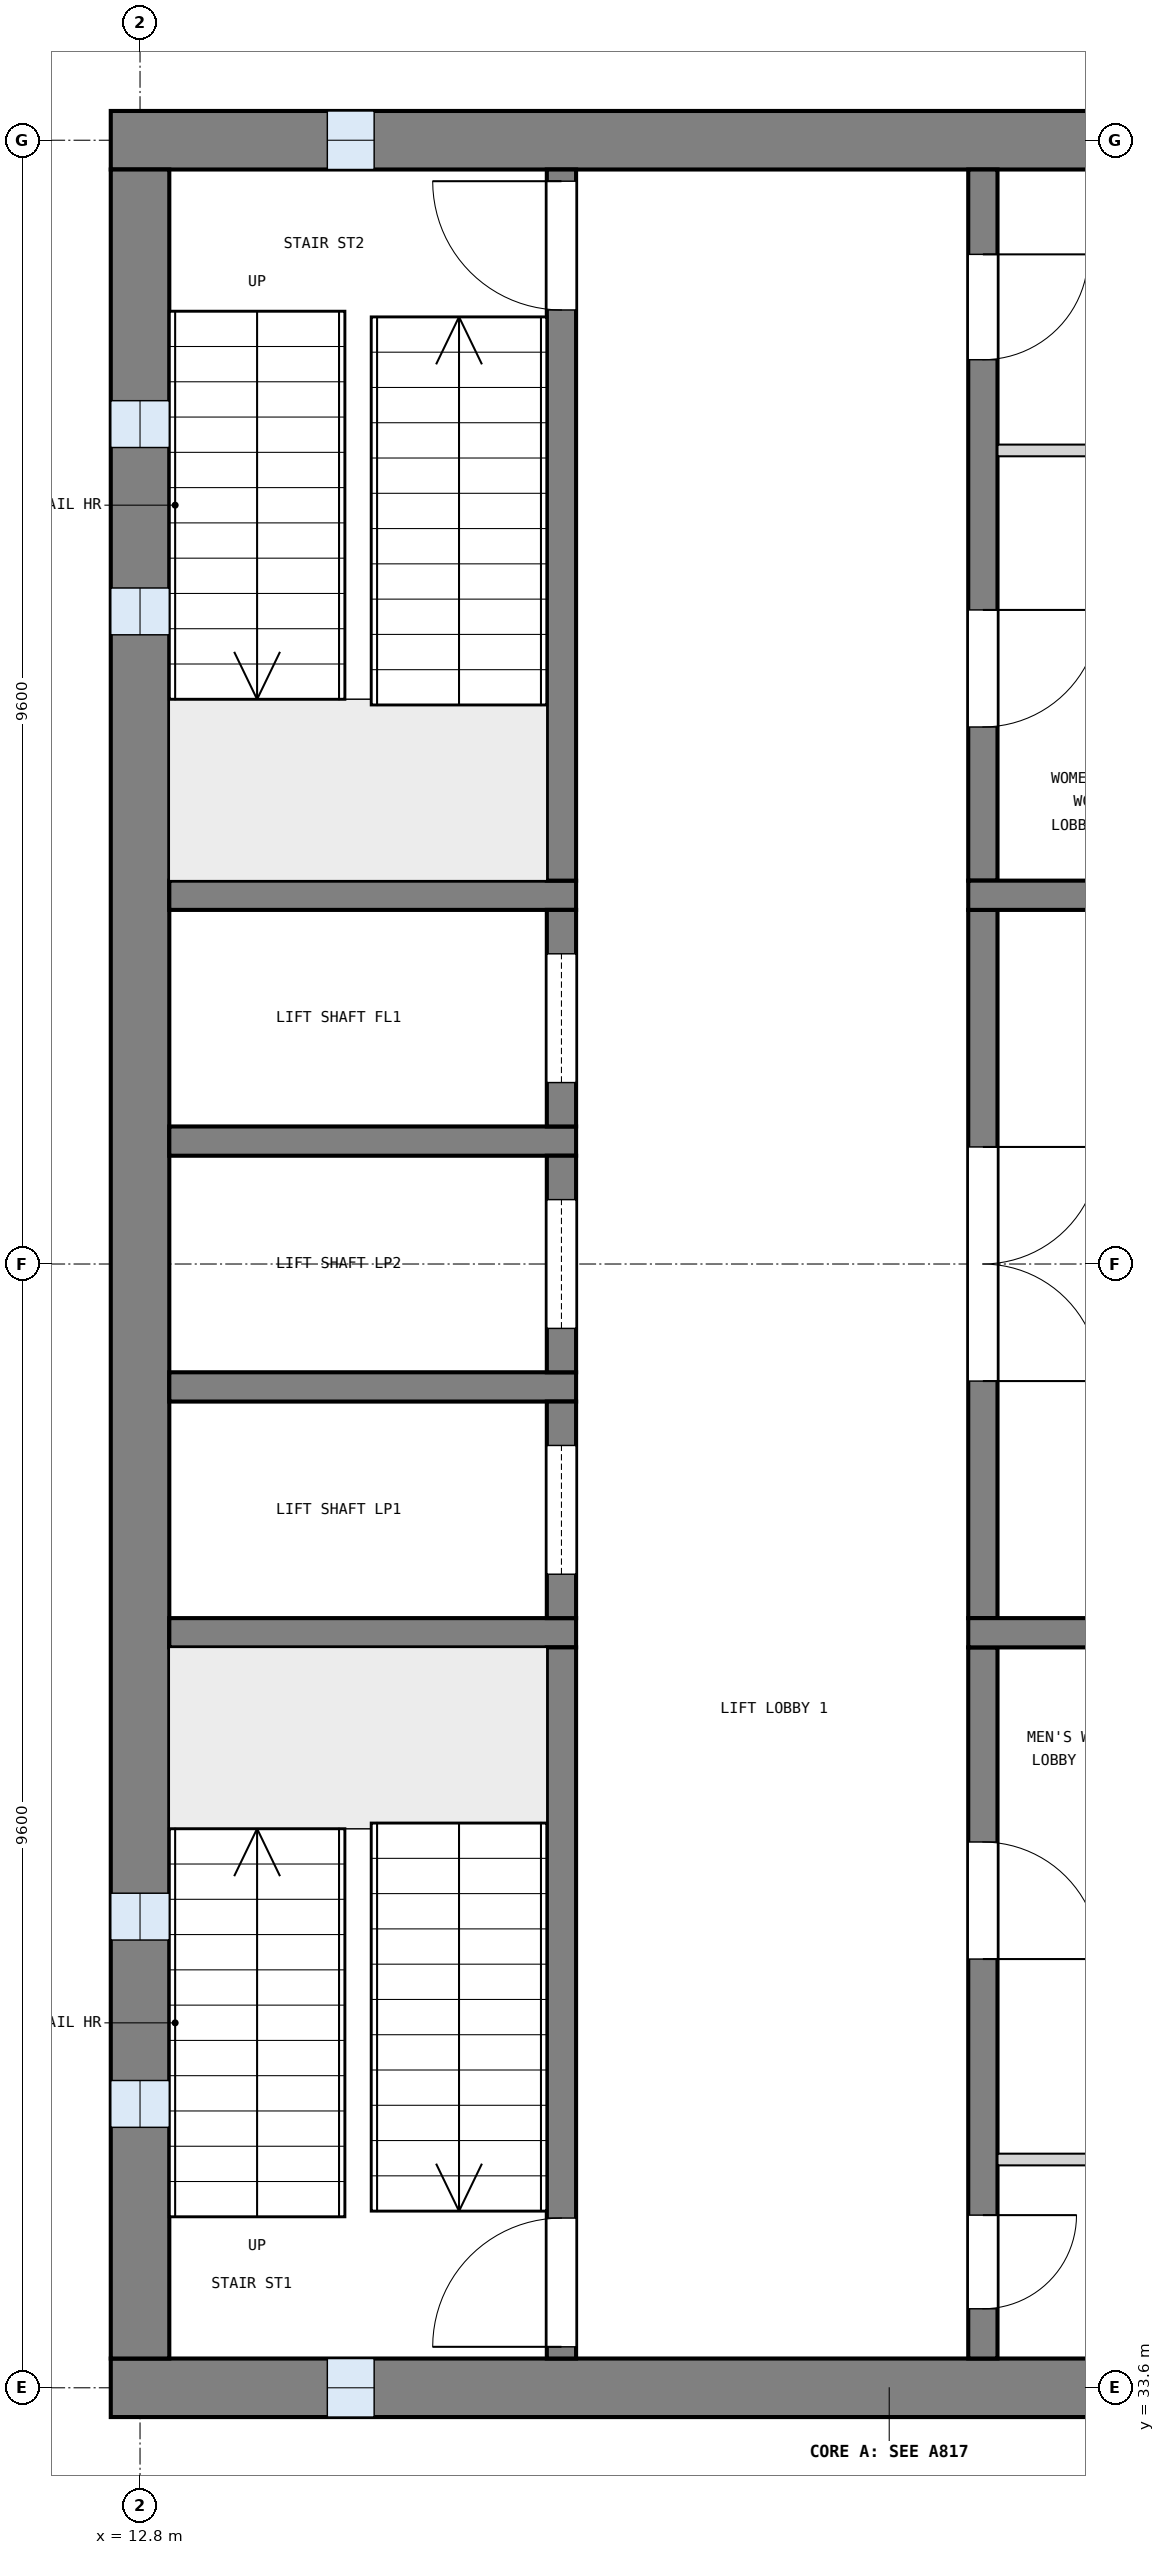
"""IFC4 building model, lengths in metres.
Left out: names, types, materials, properties, quantities, classifications, styles, units other than length and angle.
Written with IfcOpenShell. Run it as: python <this file> out.ifc"""

import sys

from ifc_helpers import new_model, si_unit, direction, frame, frame_2d, origin, place, context, subcontext, project, spatial, rectangle, extrude, element, fill, save


model = new_model("IFC4")
c1 = context("Model", 3, precision=1e-05, world=origin(), true_north=direction((0.0, 1.0)))
c2 = subcontext(c1, "Body", "Model", "MODEL_VIEW")
j1 = project(units=[si_unit("LENGTHUNIT", "METRE"), si_unit("PLANEANGLEUNIT", "RADIAN")], contexts=[c1])
p1 = place(None, origin())
s1 = spatial("IfcSite", under=j1, at=p1, CompositionType="ELEMENT")
p2 = place(p1, origin())
s2 = spatial("IfcBuilding", under=s1, at=p2, CompositionType="ELEMENT")
p3 = place(p2, frame((0.0, 0.0, 60.0)))
s3 = spatial("IfcBuildingStorey", under=s2, at=p3, CompositionType="ELEMENT", Elevation=60.0)
p4 = place(p3, frame((12.55, 52.8, 0.0), z_axis=(0.0, 0.0, 1.0), x_axis=(1.0, 0.0, 0.0)))
e1 = element("IfcWall", 1, at=p4, inside=s3, PredefinedType="SHEAR", context=c2, shape_type="SweptSolid", body=[
    extrude(rectangle(XDim=13.3, YDim=0.5, at=frame_2d((6.65, 0.0))), origin(), (0.0, 0.0, 1.0), 4.2),
])
p5 = place(p4, frame((1.85, 0.0, 1.0)))
e2 = element("IfcOpeningElement", 2, at=p5, cuts=e1, PredefinedType="OPENING", context=c2, shape_type="SweptSolid", body=[
    extrude(rectangle(XDim=0.4, YDim=2.0, at=frame_2d((0.2, 1.0))), frame((0.0, 0.26, 0.0), z_axis=(0.0, -1.0, 0.0), x_axis=(1.0, 0.0, 0.0)), (0.0, 0.0, 1.0), 0.52),
])
p6 = place(p3, frame((12.55, 33.6, 0.0), z_axis=(0.0, 0.0, 1.0), x_axis=(1.0, 0.0, 0.0)))
e3 = element("IfcWall", 3, at=p6, inside=s3, PredefinedType="SHEAR", context=c2, shape_type="SweptSolid", body=[
    extrude(rectangle(XDim=13.3, YDim=0.5, at=frame_2d((6.65, 0.0))), origin(), (0.0, 0.0, 1.0), 4.2),
])
p7 = place(p6, frame((1.85, 0.0, 1.0)))
e4 = element("IfcOpeningElement", 4, at=p7, cuts=e3, PredefinedType="OPENING", context=c2, shape_type="SweptSolid", body=[
    extrude(rectangle(XDim=0.4, YDim=2.0, at=frame_2d((0.2, 1.0))), frame((0.0, 0.26, 0.0), z_axis=(0.0, -1.0, 0.0), x_axis=(1.0, 0.0, 0.0)), (0.0, 0.0, 1.0), 0.52),
])
p8 = place(p3, frame((12.8, 33.85, 0.0), z_axis=(0.0, 0.0, 1.0), x_axis=(0.0, 1.0, 0.0)))
e5 = element("IfcWall", 5, at=p8, inside=s3, PredefinedType="SHEAR", context=c2, shape_type="SweptSolid", body=[
    extrude(rectangle(XDim=18.7, YDim=0.5, at=frame_2d((9.35, 0.0))), origin(), (0.0, 0.0, 1.0), 4.2),
])
p9 = place(p8, frame((1.975, 0.0, 1.0)))
e6 = element("IfcOpeningElement", 6, at=p9, cuts=e5, PredefinedType="OPENING", context=c2, shape_type="SweptSolid", body=[
    extrude(rectangle(XDim=0.4, YDim=2.0, at=frame_2d((0.2, 1.0))), frame((0.0, 0.26, 0.0), z_axis=(0.0, -1.0, 0.0), x_axis=(1.0, 0.0, 0.0)), (0.0, 0.0, 1.0), 0.52),
])
p10 = place(p8, frame((3.575, 0.0, 1.0)))
e7 = element("IfcOpeningElement", 7, at=p10, cuts=e5, PredefinedType="OPENING", context=c2, shape_type="SweptSolid", body=[
    extrude(rectangle(XDim=0.4, YDim=2.0, at=frame_2d((0.2, 1.0))), frame((0.0, 0.26, 0.0), z_axis=(0.0, -1.0, 0.0), x_axis=(1.0, 0.0, 0.0)), (0.0, 0.0, 1.0), 0.52),
])
p11 = place(p8, frame((14.725, 0.0, 1.0)))
e8 = element("IfcOpeningElement", 8, at=p11, cuts=e5, PredefinedType="OPENING", context=c2, shape_type="SweptSolid", body=[
    extrude(rectangle(XDim=0.4, YDim=2.0, at=frame_2d((0.2, 1.0))), frame((0.0, 0.26, 0.0), z_axis=(0.0, -1.0, 0.0), x_axis=(1.0, 0.0, 0.0)), (0.0, 0.0, 1.0), 0.52),
])
p12 = place(p8, frame((16.325, 0.0, 1.0)))
e9 = element("IfcOpeningElement", 9, at=p12, cuts=e5, PredefinedType="OPENING", context=c2, shape_type="SweptSolid", body=[
    extrude(rectangle(XDim=0.4, YDim=2.0, at=frame_2d((0.2, 1.0))), frame((0.0, 0.26, 0.0), z_axis=(0.0, -1.0, 0.0), x_axis=(1.0, 0.0, 0.0)), (0.0, 0.0, 1.0), 0.52),
])
for number, where, z_axis, x_axis in (
    (10, (13.05, 40.05, 0.0), (0.0, 0.0, 1.0), (1.0, 0.0, 0.0)),
    (11, (13.05, 42.15, 0.0), (0.0, 0.0, 1.0), (1.0, 0.0, 0.0)),
    (12, (13.05, 44.25, 0.0), (0.0, 0.0, 1.0), (1.0, 0.0, 0.0)),
    (13, (13.05, 46.35, 0.0), (0.0, 0.0, 1.0), (1.0, 0.0, 0.0)),
):
    element("IfcWall", number, at=place(p3, frame(where, z_axis=z_axis, x_axis=x_axis)), inside=s3, PredefinedType="SOLIDWALL", context=c2, shape_type="SweptSolid", body=[
        extrude(rectangle(XDim=3.475, YDim=0.25, at=frame_2d((1.737, 0.0))), origin(), (0.0, 0.0, 1.0), 3.9),
    ])
p13 = place(p3, frame((16.4, 33.85, 0.0), z_axis=(0.0, 0.0, 1.0), x_axis=(0.0, 1.0, 0.0)))
e14 = element("IfcWall", 14, at=p13, inside=s3, PredefinedType="SOLIDWALL", context=c2, shape_type="SweptSolid", body=[
    extrude(rectangle(XDim=6.075, YDim=0.25, at=frame_2d((3.038, 0.0))), origin(), (0.0, 0.0, 1.0), 3.9),
])
p14 = place(p13, frame((0.1, 0.0, 0.0)))
e15 = element("IfcOpeningElement", 15, at=p14, cuts=e14, PredefinedType="OPENING", context=c2, shape_type="SweptSolid", body=[
    extrude(rectangle(XDim=1.1, YDim=2.1, at=frame_2d((0.55, 1.05))), frame((0.0, 0.135, 0.0), z_axis=(0.0, -1.0, 0.0), x_axis=(1.0, 0.0, 0.0)), (0.0, 0.0, 1.0), 0.27),
])
p15 = place(p3, frame((16.4, 40.175, 0.0), z_axis=(0.0, 0.0, 1.0), x_axis=(0.0, 1.0, 0.0)))
e16 = element("IfcWall", 16, at=p15, inside=s3, PredefinedType="SOLIDWALL", context=c2, shape_type="SweptSolid", body=[
    extrude(rectangle(XDim=1.85, YDim=0.25, at=frame_2d((0.925, 0.0))), origin(), (0.0, 0.0, 1.0), 3.9),
])
p16 = place(p15, frame((0.375, 0.0, 0.0)))
e17 = element("IfcOpeningElement", 17, at=p16, cuts=e16, PredefinedType="OPENING", context=c2, shape_type="SweptSolid", body=[
    extrude(rectangle(XDim=1.1, YDim=2.1, at=frame_2d((0.55, 1.05))), frame((0.0, 0.135, 0.0), z_axis=(0.0, -1.0, 0.0), x_axis=(1.0, 0.0, 0.0)), (0.0, 0.0, 1.0), 0.27),
])
p17 = place(p3, frame((16.4, 42.275, 0.0), z_axis=(0.0, 0.0, 1.0), x_axis=(0.0, 1.0, 0.0)))
e18 = element("IfcWall", 18, at=p17, inside=s3, PredefinedType="SOLIDWALL", context=c2, shape_type="SweptSolid", body=[
    extrude(rectangle(XDim=1.85, YDim=0.25, at=frame_2d((0.925, 0.0))), origin(), (0.0, 0.0, 1.0), 3.9),
])
p18 = place(p17, frame((0.375, 0.0, 0.0)))
e19 = element("IfcOpeningElement", 19, at=p18, cuts=e18, PredefinedType="OPENING", context=c2, shape_type="SweptSolid", body=[
    extrude(rectangle(XDim=1.1, YDim=2.1, at=frame_2d((0.55, 1.05))), frame((0.0, 0.135, 0.0), z_axis=(0.0, -1.0, 0.0), x_axis=(1.0, 0.0, 0.0)), (0.0, 0.0, 1.0), 0.27),
])
p19 = place(p3, frame((16.4, 44.375, 0.0), z_axis=(0.0, 0.0, 1.0), x_axis=(0.0, 1.0, 0.0)))
e20 = element("IfcWall", 20, at=p19, inside=s3, PredefinedType="SOLIDWALL", context=c2, shape_type="SweptSolid", body=[
    extrude(rectangle(XDim=1.85, YDim=0.25, at=frame_2d((0.925, 0.0))), origin(), (0.0, 0.0, 1.0), 3.9),
])
p20 = place(p19, frame((0.375, 0.0, 0.0)))
e21 = element("IfcOpeningElement", 21, at=p20, cuts=e20, PredefinedType="OPENING", context=c2, shape_type="SweptSolid", body=[
    extrude(rectangle(XDim=1.1, YDim=2.1, at=frame_2d((0.55, 1.05))), frame((0.0, 0.135, 0.0), z_axis=(0.0, -1.0, 0.0), x_axis=(1.0, 0.0, 0.0)), (0.0, 0.0, 1.0), 0.27),
])
p21 = place(p3, frame((16.4, 46.475, 0.0), z_axis=(0.0, 0.0, 1.0), x_axis=(0.0, 1.0, 0.0)))
e22 = element("IfcWall", 22, at=p21, inside=s3, PredefinedType="SOLIDWALL", context=c2, shape_type="SweptSolid", body=[
    extrude(rectangle(XDim=6.075, YDim=0.25, at=frame_2d((3.038, 0.0))), origin(), (0.0, 0.0, 1.0), 3.9),
])
p22 = place(p21, frame((4.875, 0.0, 0.0)))
e23 = element("IfcOpeningElement", 23, at=p22, cuts=e22, PredefinedType="OPENING", context=c2, shape_type="SweptSolid", body=[
    extrude(rectangle(XDim=1.1, YDim=2.1, at=frame_2d((0.55, 1.05))), frame((0.0, 0.135, 0.0), z_axis=(0.0, -1.0, 0.0), x_axis=(1.0, 0.0, 0.0)), (0.0, 0.0, 1.0), 0.27),
])
p23 = place(p3, frame((20.0, 33.85, 0.0), z_axis=(0.0, 0.0, 1.0), x_axis=(0.0, 1.0, 0.0)))
e24 = element("IfcWall", 24, at=p23, inside=s3, PredefinedType="SOLIDWALL", context=c2, shape_type="SweptSolid", body=[
    extrude(rectangle(XDim=6.075, YDim=0.25, at=frame_2d((3.038, 0.0))), origin(), (0.0, 0.0, 1.0), 3.9),
])
p24 = place(p23, frame((0.425, 0.0, 0.0)))
e25 = element("IfcOpeningElement", 25, at=p24, cuts=e24, PredefinedType="OPENING", context=c2, shape_type="SweptSolid", body=[
    extrude(rectangle(XDim=0.8, YDim=2.1, at=frame_2d((0.4, 1.05))), frame((0.0, 0.135, 0.0), z_axis=(0.0, -1.0, 0.0), x_axis=(1.0, 0.0, 0.0)), (0.0, 0.0, 1.0), 0.27),
])
p25 = place(p23, frame((3.413, 0.0, 0.0)))
e26 = element("IfcOpeningElement", 26, at=p25, cuts=e24, PredefinedType="OPENING", context=c2, shape_type="SweptSolid", body=[
    extrude(rectangle(XDim=1.0, YDim=2.1, at=frame_2d((0.5, 1.05))), frame((0.0, 0.135, 0.0), z_axis=(0.0, -1.0, 0.0), x_axis=(1.0, 0.0, 0.0)), (0.0, 0.0, 1.0), 0.27),
])
p26 = place(p3, frame((20.0, 40.175, 0.0), z_axis=(0.0, 0.0, 1.0), x_axis=(0.0, 1.0, 0.0)))
e27 = element("IfcWall", 27, at=p26, inside=s3, PredefinedType="SOLIDWALL", context=c2, shape_type="SweptSolid", body=[
    extrude(rectangle(XDim=6.05, YDim=0.25, at=frame_2d((3.025, 0.0))), origin(), (0.0, 0.0, 1.0), 3.9),
])
p27 = place(p26, frame((2.025, 0.0, 0.0)))
e28 = element("IfcOpeningElement", 28, at=p27, cuts=e27, PredefinedType="OPENING", context=c2, shape_type="SweptSolid", body=[
    extrude(rectangle(XDim=2.0, YDim=2.1, at=frame_2d((1.0, 1.05))), frame((0.0, 0.135, 0.0), z_axis=(0.0, -1.0, 0.0), x_axis=(1.0, 0.0, 0.0)), (0.0, 0.0, 1.0), 0.27),
])
p28 = place(p3, frame((20.0, 46.475, 0.0), z_axis=(0.0, 0.0, 1.0), x_axis=(0.0, 1.0, 0.0)))
e29 = element("IfcWall", 29, at=p28, inside=s3, PredefinedType="SOLIDWALL", context=c2, shape_type="SweptSolid", body=[
    extrude(rectangle(XDim=6.075, YDim=0.25, at=frame_2d((3.038, 0.0))), origin(), (0.0, 0.0, 1.0), 3.9),
])
p29 = place(p28, frame((1.312, 0.0, 0.0)))
e30 = element("IfcOpeningElement", 30, at=p29, cuts=e29, PredefinedType="OPENING", context=c2, shape_type="SweptSolid", body=[
    extrude(rectangle(XDim=1.0, YDim=2.1, at=frame_2d((0.5, 1.05))), frame((0.0, 0.135, 0.0), z_axis=(0.0, -1.0, 0.0), x_axis=(1.0, 0.0, 0.0)), (0.0, 0.0, 1.0), 0.27),
])
p30 = place(p28, frame((4.45, 0.0, 0.0)))
e31 = element("IfcOpeningElement", 31, at=p30, cuts=e29, PredefinedType="OPENING", context=c2, shape_type="SweptSolid", body=[
    extrude(rectangle(XDim=0.9, YDim=2.1, at=frame_2d((0.45, 1.05))), frame((0.0, 0.135, 0.0), z_axis=(0.0, -1.0, 0.0), x_axis=(1.0, 0.0, 0.0)), (0.0, 0.0, 1.0), 0.27),
])
for number, where, z_axis, x_axis in (
    (32, (19.875, 40.05, 0.0), (0.0, 0.0, 1.0), (1.0, 0.0, 0.0)),
    (33, (19.875, 46.35, 0.0), (0.0, 0.0, 1.0), (1.0, 0.0, 0.0)),
):
    element("IfcWall", number, at=place(p3, frame(where, z_axis=z_axis, x_axis=x_axis)), inside=s3, PredefinedType="SOLIDWALL", context=c2, shape_type="SweptSolid", body=[
        extrude(rectangle(XDim=5.475, YDim=0.25, at=frame_2d((2.738, 0.0))), origin(), (0.0, 0.0, 1.0), 3.9),
    ])
for number, where, z_axis, x_axis in (
    (34, (20.125, 35.55, 0.0), (0.0, 0.0, 1.0), (1.0, 0.0, 0.0)),
    (35, (20.125, 50.15, 0.0), (0.0, 0.0, 1.0), (1.0, 0.0, 0.0)),
):
    element("IfcWall", number, at=place(p3, frame(where, z_axis=z_axis, x_axis=x_axis)), inside=s3, PredefinedType="PARTITIONING", context=c2, shape_type="SweptSolid", body=[
        extrude(rectangle(XDim=5.225, YDim=0.1, at=frame_2d((2.613, 0.0))), origin(), (0.0, 0.0, 1.0), 3.9),
    ])
p31 = place(p9, origin())
e36 = element("IfcWindow", 36, at=p31, inside=s3, PartitioningType="SINGLE_PANEL", PredefinedType="WINDOW", context=c2, shape_type="SweptSolid", body=[
    extrude(rectangle(XDim=0.4, YDim=2.0, at=frame_2d((0.2, 1.0))), frame((0.0, 0.03, 0.0), z_axis=(0.0, -1.0, 0.0), x_axis=(1.0, 0.0, 0.0)), (0.0, 0.0, 1.0), 0.06),
])
fill(e6, e36)
p32 = place(p10, origin())
e37 = element("IfcWindow", 37, at=p32, inside=s3, PartitioningType="SINGLE_PANEL", PredefinedType="WINDOW", context=c2, shape_type="SweptSolid", body=[
    extrude(rectangle(XDim=0.4, YDim=2.0, at=frame_2d((0.2, 1.0))), frame((0.0, 0.03, 0.0), z_axis=(0.0, -1.0, 0.0), x_axis=(1.0, 0.0, 0.0)), (0.0, 0.0, 1.0), 0.06),
])
fill(e7, e37)
p33 = place(p11, origin())
e38 = element("IfcWindow", 38, at=p33, inside=s3, PartitioningType="SINGLE_PANEL", PredefinedType="WINDOW", context=c2, shape_type="SweptSolid", body=[
    extrude(rectangle(XDim=0.4, YDim=2.0, at=frame_2d((0.2, 1.0))), frame((0.0, 0.03, 0.0), z_axis=(0.0, -1.0, 0.0), x_axis=(1.0, 0.0, 0.0)), (0.0, 0.0, 1.0), 0.06),
])
fill(e8, e38)
p34 = place(p12, origin())
e39 = element("IfcWindow", 39, at=p34, inside=s3, PartitioningType="SINGLE_PANEL", PredefinedType="WINDOW", context=c2, shape_type="SweptSolid", body=[
    extrude(rectangle(XDim=0.4, YDim=2.0, at=frame_2d((0.2, 1.0))), frame((0.0, 0.03, 0.0), z_axis=(0.0, -1.0, 0.0), x_axis=(1.0, 0.0, 0.0)), (0.0, 0.0, 1.0), 0.06),
])
fill(e9, e39)
p35 = place(p7, origin())
e40 = element("IfcWindow", 40, at=p35, inside=s3, PartitioningType="SINGLE_PANEL", PredefinedType="WINDOW", context=c2, shape_type="SweptSolid", body=[
    extrude(rectangle(XDim=0.4, YDim=2.0, at=frame_2d((0.2, 1.0))), frame((0.0, 0.03, 0.0), z_axis=(0.0, -1.0, 0.0), x_axis=(1.0, 0.0, 0.0)), (0.0, 0.0, 1.0), 0.06),
])
fill(e4, e40)
p36 = place(p5, origin())
e41 = element("IfcWindow", 41, at=p36, inside=s3, PartitioningType="SINGLE_PANEL", PredefinedType="WINDOW", context=c2, shape_type="SweptSolid", body=[
    extrude(rectangle(XDim=0.4, YDim=2.0, at=frame_2d((0.2, 1.0))), frame((0.0, 0.03, 0.0), z_axis=(0.0, -1.0, 0.0), x_axis=(1.0, 0.0, 0.0)), (0.0, 0.0, 1.0), 0.06),
])
fill(e2, e41)
p37 = place(p14, origin())
e42 = element("IfcDoor", 42, at=p37, inside=s3, OperationType="SINGLE_SWING_LEFT", PredefinedType="DOOR", context=c2, shape_type="SweptSolid", body=[
    extrude(rectangle(XDim=1.1, YDim=2.1, at=frame_2d((0.55, 1.05))), frame((0.0, 0.025, 0.0), z_axis=(0.0, -1.0, 0.0), x_axis=(1.0, 0.0, 0.0)), (0.0, 0.0, 1.0), 0.05),
])
fill(e15, e42)
p38 = place(p22, origin())
e43 = element("IfcDoor", 43, at=p38, inside=s3, OperationType="SINGLE_SWING_RIGHT", PredefinedType="DOOR", context=c2, shape_type="SweptSolid", body=[
    extrude(rectangle(XDim=1.1, YDim=2.1, at=frame_2d((0.55, 1.05))), frame((0.0, 0.025, 0.0), z_axis=(0.0, -1.0, 0.0), x_axis=(1.0, 0.0, 0.0)), (0.0, 0.0, 1.0), 0.05),
])
fill(e23, e43)
p39 = place(p16, origin())
e44 = element("IfcDoor", 44, at=p39, inside=s3, OperationType="SLIDING_TO_LEFT", PredefinedType="DOOR", context=c2, shape_type="SweptSolid", body=[
    extrude(rectangle(XDim=1.1, YDim=2.1, at=frame_2d((0.55, 1.05))), frame((0.0, 0.025, 0.0), z_axis=(0.0, -1.0, 0.0), x_axis=(1.0, 0.0, 0.0)), (0.0, 0.0, 1.0), 0.05),
])
fill(e17, e44)
p40 = place(p18, origin())
e45 = element("IfcDoor", 45, at=p40, inside=s3, OperationType="SLIDING_TO_LEFT", PredefinedType="DOOR", context=c2, shape_type="SweptSolid", body=[
    extrude(rectangle(XDim=1.1, YDim=2.1, at=frame_2d((0.55, 1.05))), frame((0.0, 0.025, 0.0), z_axis=(0.0, -1.0, 0.0), x_axis=(1.0, 0.0, 0.0)), (0.0, 0.0, 1.0), 0.05),
])
fill(e19, e45)
p41 = place(p20, origin())
e46 = element("IfcDoor", 46, at=p41, inside=s3, OperationType="SLIDING_TO_LEFT", PredefinedType="DOOR", context=c2, shape_type="SweptSolid", body=[
    extrude(rectangle(XDim=1.1, YDim=2.1, at=frame_2d((0.55, 1.05))), frame((0.0, 0.025, 0.0), z_axis=(0.0, -1.0, 0.0), x_axis=(1.0, 0.0, 0.0)), (0.0, 0.0, 1.0), 0.05),
])
fill(e21, e46)
p42 = place(p27, frame((2.0, 0.0, 0.0), z_axis=(0.0, 0.0, 1.0), x_axis=(-1.0, 0.0, 0.0)))
e47 = element("IfcDoor", 47, at=p42, inside=s3, OperationType="DOUBLE_DOOR_SINGLE_SWING", PredefinedType="DOOR", context=c2, shape_type="SweptSolid", body=[
    extrude(rectangle(XDim=2.0, YDim=2.1, at=frame_2d((1.0, 1.05))), frame((0.0, 0.025, 0.0), z_axis=(0.0, -1.0, 0.0), x_axis=(1.0, 0.0, 0.0)), (0.0, 0.0, 1.0), 0.05),
])
fill(e28, e47)
p43 = place(p24, frame((0.8, 0.0, 0.0), z_axis=(0.0, 0.0, 1.0), x_axis=(-1.0, 0.0, 0.0)))
e48 = element("IfcDoor", 48, at=p43, inside=s3, OperationType="SINGLE_SWING_LEFT", PredefinedType="DOOR", context=c2, shape_type="SweptSolid", body=[
    extrude(rectangle(XDim=0.8, YDim=2.1, at=frame_2d((0.4, 1.05))), frame((0.0, 0.025, 0.0), z_axis=(0.0, -1.0, 0.0), x_axis=(1.0, 0.0, 0.0)), (0.0, 0.0, 1.0), 0.05),
])
fill(e25, e48)
p44 = place(p25, frame((1.0, 0.0, 0.0), z_axis=(0.0, 0.0, 1.0), x_axis=(-1.0, 0.0, 0.0)))
e49 = element("IfcDoor", 49, at=p44, inside=s3, OperationType="SINGLE_SWING_RIGHT", PredefinedType="DOOR", context=c2, shape_type="SweptSolid", body=[
    extrude(rectangle(XDim=1.0, YDim=2.1, at=frame_2d((0.5, 1.05))), frame((0.0, 0.025, 0.0), z_axis=(0.0, -1.0, 0.0), x_axis=(1.0, 0.0, 0.0)), (0.0, 0.0, 1.0), 0.05),
])
fill(e26, e49)
p45 = place(p29, frame((1.0, 0.0, 0.0), z_axis=(0.0, 0.0, 1.0), x_axis=(-1.0, 0.0, 0.0)))
e50 = element("IfcDoor", 50, at=p45, inside=s3, OperationType="SINGLE_SWING_LEFT", PredefinedType="DOOR", context=c2, shape_type="SweptSolid", body=[
    extrude(rectangle(XDim=1.0, YDim=2.1, at=frame_2d((0.5, 1.05))), frame((0.0, 0.025, 0.0), z_axis=(0.0, -1.0, 0.0), x_axis=(1.0, 0.0, 0.0)), (0.0, 0.0, 1.0), 0.05),
])
fill(e30, e50)
p46 = place(p30, frame((0.9, 0.0, 0.0), z_axis=(0.0, 0.0, 1.0), x_axis=(-1.0, 0.0, 0.0)))
e51 = element("IfcDoor", 51, at=p46, inside=s3, OperationType="SINGLE_SWING_LEFT", PredefinedType="DOOR", context=c2, shape_type="SweptSolid", body=[
    extrude(rectangle(XDim=0.9, YDim=2.1, at=frame_2d((0.45, 1.05))), frame((0.0, 0.025, 0.0), z_axis=(0.0, -1.0, 0.0), x_axis=(1.0, 0.0, 0.0)), (0.0, 0.0, 1.0), 0.05),
])
fill(e31, e51)
save(model, sys.argv[1])
